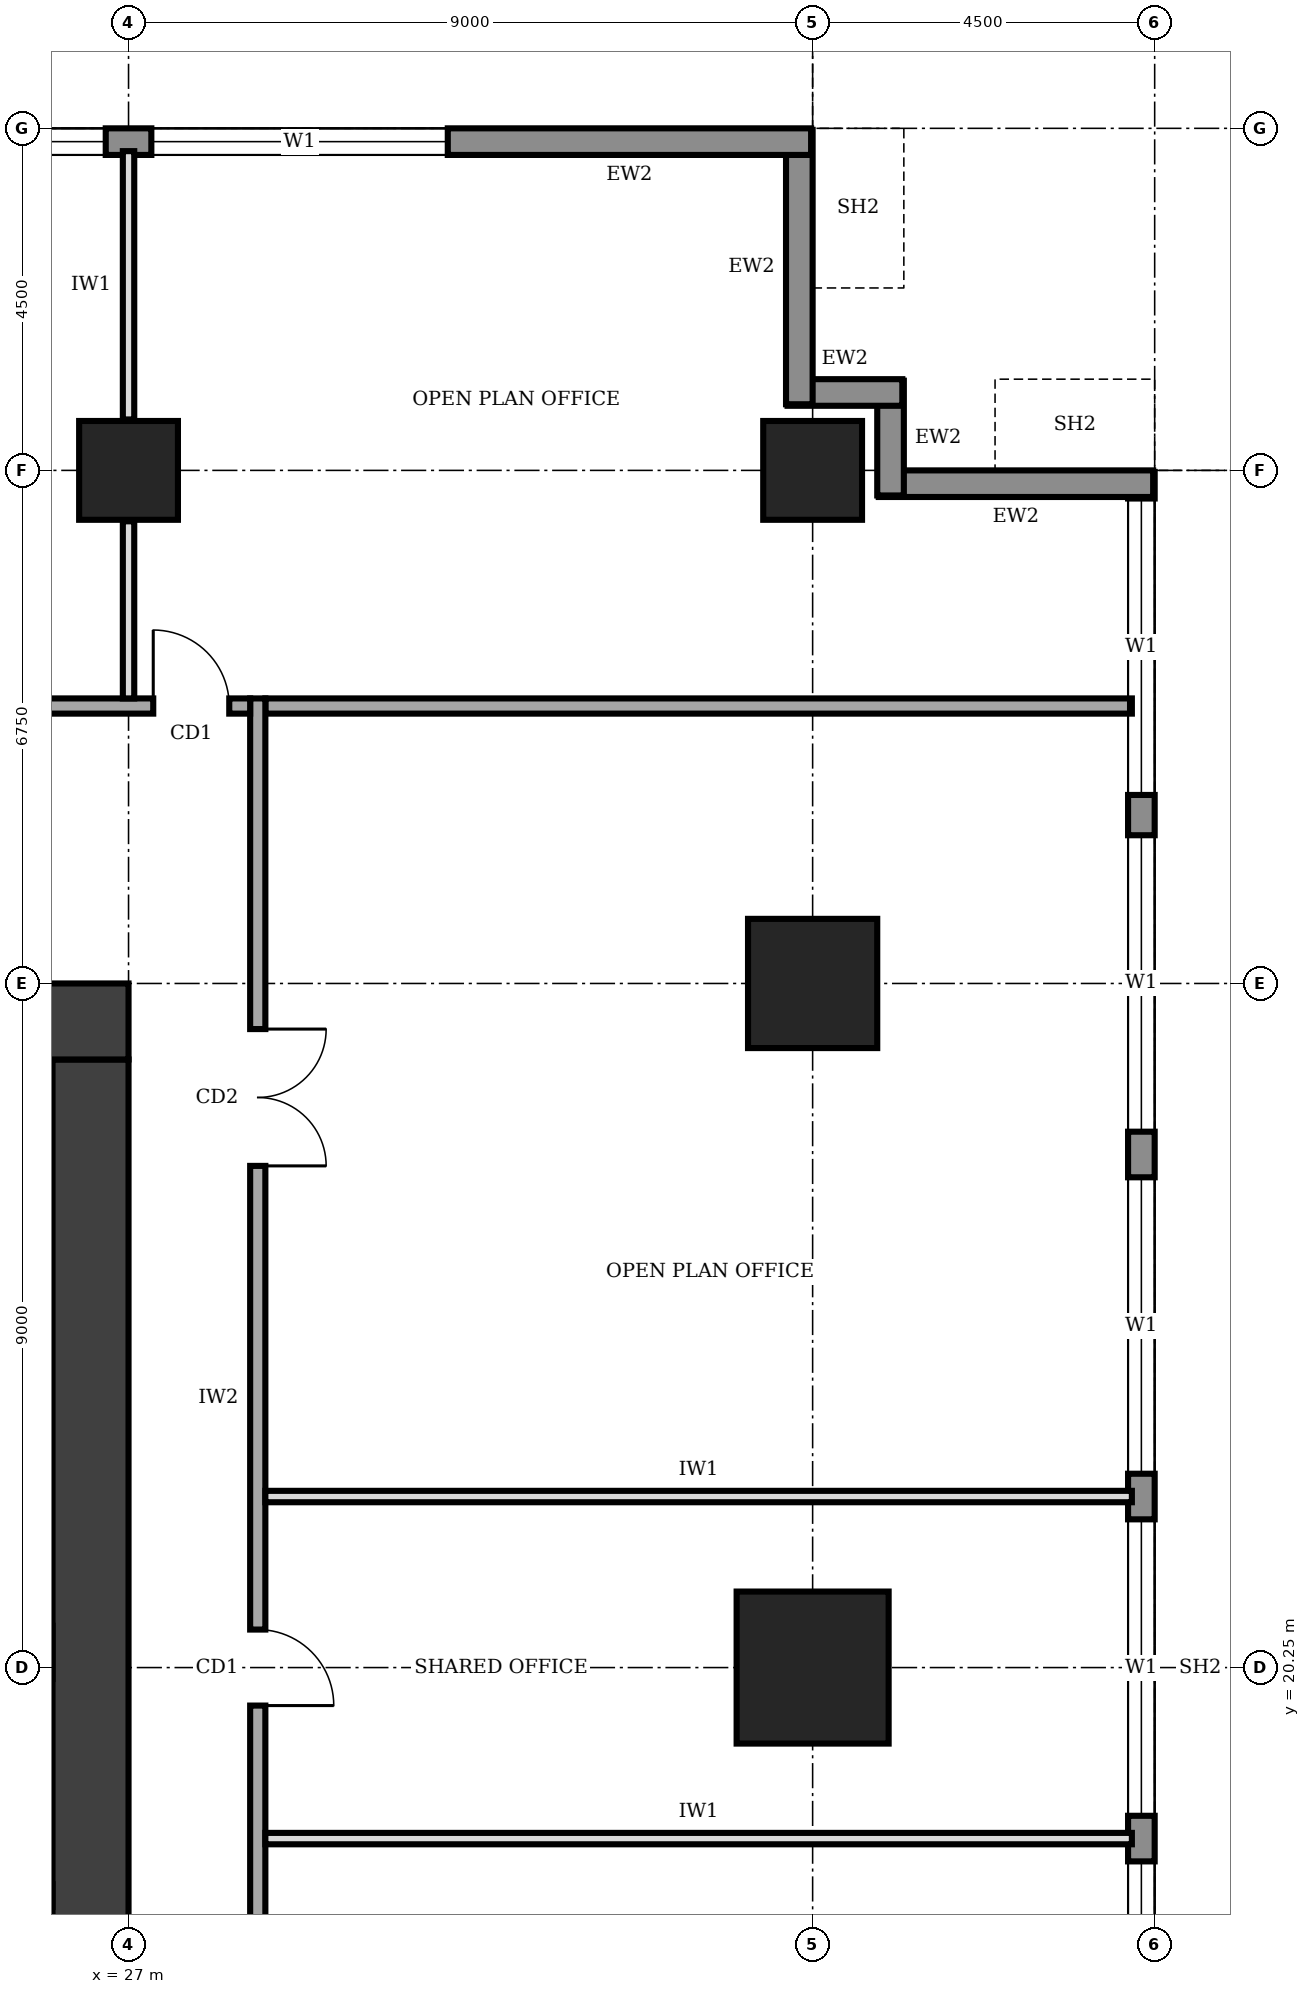
"""IFC4 building model, lengths in metres.
Left out: names, types, materials, properties, quantities, classifications, styles, units other than length and angle.
Written with IfcOpenShell. Run it as: python <this file> out.ifc"""

import sys

from ifc_helpers import new_model, si_unit, direction, frame, frame_2d, origin, origin_2d, place, context, subcontext, project, spatial, rectangle, extrude, element, fill, save


model = new_model("IFC4")
c1 = context("Model", 3, precision=1e-05, world=origin(), true_north=direction((0.0, 1.0)))
c2 = subcontext(c1, "Body", "Model", "MODEL_VIEW")
j1 = project(units=[si_unit("LENGTHUNIT", "METRE"), si_unit("PLANEANGLEUNIT", "RADIAN")], contexts=[c1])
p1 = place(None, origin())
s1 = spatial("IfcSite", under=j1, at=p1, CompositionType="ELEMENT")
p2 = place(p1, origin())
s2 = spatial("IfcBuilding", under=s1, at=p2, CompositionType="ELEMENT")
p3 = place(p2, frame((0.0, 0.0, 281.0)))
s3 = spatial("IfcBuildingStorey", under=s2, at=p3, CompositionType="ELEMENT", Elevation=281.0)
p4 = place(p3, frame((26.5, 12.25, 0.0), z_axis=(0.0, 0.0, 1.0), x_axis=(0.0, 1.0, 0.0)))
e1 = element("IfcWall", 1, at=p4, inside=s3, PredefinedType="SHEAR", context=c2, shape_type="SweptSolid", body=[
    extrude(rectangle(XDim=16.0, YDim=1.0, at=frame_2d((8.0, 0.0))), origin(), (0.0, 0.0, 1.0), 4.0),
])
p5 = place(p3, frame((27.0, 28.75, 0.0), z_axis=(0.0, 0.0, 1.0), x_axis=(-1.0, 0.0, 0.0)))
e2 = element("IfcWall", 2, at=p5, inside=s3, PredefinedType="SHEAR", context=c2, shape_type="SweptSolid", body=[
    extrude(rectangle(XDim=13.5, YDim=1.0, at=frame_2d((6.75, 0.0))), origin(), (0.0, 0.0, 1.0), 4.0),
])
p6 = place(p5, frame((4.75, 0.0, 0.0)))
e3 = element("IfcOpeningElement", 3, at=p6, cuts=e2, PredefinedType="OPENING", context=c2, shape_type="SweptSolid", body=[
    extrude(rectangle(XDim=1.8, YDim=2.1, at=frame_2d((0.9, 1.05))), frame((0.0, 0.51, 0.0), z_axis=(0.0, -1.0, 0.0), x_axis=(1.0, 0.0, 0.0)), (0.0, 0.0, 1.0), 1.02),
])
p7 = place(p3, frame((36.0, 20.25, 0.0), z_axis=(0.0, 0.0, 1.0), x_axis=(1.0, 0.0, 0.0)))
e4 = element("IfcColumn", 4, at=p7, inside=s3, PredefinedType="COLUMN", context=c2, shape_type="SweptSolid", body=[
    extrude(rectangle(XDim=2.0, YDim=2.0, at=origin_2d()), origin(), (0.0, 0.0, 1.0), 4.0),
])
p8 = place(p3, frame((36.0, 29.25, 0.0), z_axis=(0.0, 0.0, 1.0), x_axis=(1.0, 0.0, 0.0)))
e5 = element("IfcColumn", 5, at=p8, inside=s3, PredefinedType="COLUMN", context=c2, shape_type="SweptSolid", body=[
    extrude(rectangle(XDim=1.7, YDim=1.7, at=origin_2d()), origin(), (0.0, 0.0, 1.0), 4.0),
])
for number, where, z_axis, x_axis in (
    (6, (27.0, 36.0, 0.0), (0.0, 0.0, 1.0), (1.0, 0.0, 0.0)),
    (7, (36.0, 36.0, 0.0), (0.0, 0.0, 1.0), (1.0, 0.0, 0.0)),
):
    element("IfcColumn", number, at=place(p3, frame(where, z_axis=z_axis, x_axis=x_axis)), inside=s3, PredefinedType="COLUMN", context=c2, shape_type="SweptSolid", body=[
        extrude(rectangle(XDim=1.3, YDim=1.3, at=origin_2d()), origin(), (0.0, 0.0, 1.0), 4.0),
    ])
p9 = place(p3, frame((40.325, 4.52, 0.0), z_axis=(0.0, 0.0, 1.0), x_axis=(0.0, 1.0, 0.0)))
e8 = element("IfcWall", 8, at=p9, inside=s3, PredefinedType="STANDARD", context=c2, shape_type="SweptSolid", body=[
    extrude(rectangle(XDim=31.46, YDim=0.35, at=frame_2d((15.73, 0.0))), origin(), (0.0, 0.0, 1.0), 3.75),
])
p10 = place(p9, frame((4.78, 0.0, 0.9)))
e9 = element("IfcOpeningElement", 9, at=p10, cuts=e8, PredefinedType="OPENING", context=c2, shape_type="SweptSolid", body=[
    extrude(rectangle(XDim=3.9, YDim=2.2, at=frame_2d((1.95, 1.1))), frame((0.0, 0.185, 0.0), z_axis=(0.0, -1.0, 0.0), x_axis=(1.0, 0.0, 0.0)), (0.0, 0.0, 1.0), 0.37),
])
p11 = place(p9, frame((9.28, 0.0, 0.9)))
e10 = element("IfcOpeningElement", 10, at=p11, cuts=e8, PredefinedType="OPENING", context=c2, shape_type="SweptSolid", body=[
    extrude(rectangle(XDim=3.9, YDim=2.2, at=frame_2d((1.95, 1.1))), frame((0.0, 0.185, 0.0), z_axis=(0.0, -1.0, 0.0), x_axis=(1.0, 0.0, 0.0)), (0.0, 0.0, 1.0), 0.37),
])
p12 = place(p9, frame((13.78, 0.0, 0.9)))
e11 = element("IfcOpeningElement", 11, at=p12, cuts=e8, PredefinedType="OPENING", context=c2, shape_type="SweptSolid", body=[
    extrude(rectangle(XDim=3.9, YDim=2.2, at=frame_2d((1.95, 1.1))), frame((0.0, 0.185, 0.0), z_axis=(0.0, -1.0, 0.0), x_axis=(1.0, 0.0, 0.0)), (0.0, 0.0, 1.0), 0.37),
])
p13 = place(p9, frame((18.28, 0.0, 0.9)))
e12 = element("IfcOpeningElement", 12, at=p13, cuts=e8, PredefinedType="OPENING", context=c2, shape_type="SweptSolid", body=[
    extrude(rectangle(XDim=3.9, YDim=2.2, at=frame_2d((1.95, 1.1))), frame((0.0, 0.185, 0.0), z_axis=(0.0, -1.0, 0.0), x_axis=(1.0, 0.0, 0.0)), (0.0, 0.0, 1.0), 0.37),
])
p14 = place(p9, frame((22.78, 0.0, 0.9)))
e13 = element("IfcOpeningElement", 13, at=p14, cuts=e8, PredefinedType="OPENING", context=c2, shape_type="SweptSolid", body=[
    extrude(rectangle(XDim=3.9, YDim=2.2, at=frame_2d((1.95, 1.1))), frame((0.0, 0.185, 0.0), z_axis=(0.0, -1.0, 0.0), x_axis=(1.0, 0.0, 0.0)), (0.0, 0.0, 1.0), 0.37),
])
p15 = place(p9, frame((27.21, 0.0, 0.9)))
e14 = element("IfcOpeningElement", 14, at=p15, cuts=e8, PredefinedType="OPENING", context=c2, shape_type="SweptSolid", body=[
    extrude(rectangle(XDim=3.9, YDim=2.2, at=frame_2d((1.95, 1.1))), frame((0.0, 0.185, 0.0), z_axis=(0.0, -1.0, 0.0), x_axis=(1.0, 0.0, 0.0)), (0.0, 0.0, 1.0), 0.37),
])
p16 = place(p3, frame((40.48, 35.825, 0.0), z_axis=(0.0, 0.0, 1.0), x_axis=(-1.0, 0.0, 0.0)))
e15 = element("IfcWall", 15, at=p16, inside=s3, PredefinedType="STANDARD", context=c2, shape_type="SweptSolid", body=[
    extrude(rectangle(XDim=3.61, YDim=0.35, at=frame_2d((1.805, 0.0))), origin(), (0.0, 0.0, 1.0), 2.85),
])
for number, where, z_axis, x_axis in (
    (16, (37.025, 35.67, 0.0), (0.0, 0.0, 1.0), (0.0, 1.0, 0.0)),
    (17, (37.18, 37.025, 0.0), (0.0, 0.0, 1.0), (-1.0, 0.0, 0.0)),
):
    element("IfcWall", number, at=place(p3, frame(where, z_axis=z_axis, x_axis=x_axis)), inside=s3, PredefinedType="STANDARD", context=c2, shape_type="SweptSolid", body=[
        extrude(rectangle(XDim=1.51, YDim=0.35, at=frame_2d((0.755, 0.0))), origin(), (0.0, 0.0, 1.0), 3.75),
    ])
p17 = place(p3, frame((35.825, 36.87, 0.0), z_axis=(0.0, 0.0, 1.0), x_axis=(0.0, 1.0, 0.0)))
e18 = element("IfcWall", 18, at=p17, inside=s3, PredefinedType="STANDARD", context=c2, shape_type="SweptSolid", body=[
    extrude(rectangle(XDim=3.61, YDim=0.35, at=frame_2d((1.805, 0.0))), origin(), (0.0, 0.0, 1.0), 2.85),
])
p18 = place(p3, frame((35.98, 40.325, 0.0), z_axis=(0.0, 0.0, 1.0), x_axis=(-1.0, 0.0, 0.0)))
e19 = element("IfcWall", 19, at=p18, inside=s3, PredefinedType="STANDARD", context=c2, shape_type="SweptSolid", body=[
    extrude(rectangle(XDim=31.46, YDim=0.35, at=frame_2d((15.73, 0.0))), origin(), (0.0, 0.0, 1.0), 3.75),
])
p19 = place(p18, frame((27.21, 0.0, 0.9)))
e20 = element("IfcOpeningElement", 20, at=p19, cuts=e19, PredefinedType="OPENING", context=c2, shape_type="SweptSolid", body=[
    extrude(rectangle(XDim=3.9, YDim=2.2, at=frame_2d((1.95, 1.1))), frame((0.0, 0.185, 0.0), z_axis=(0.0, -1.0, 0.0), x_axis=(1.0, 0.0, 0.0)), (0.0, 0.0, 1.0), 0.37),
])
p20 = place(p18, frame((22.78, 0.0, 0.9)))
e21 = element("IfcOpeningElement", 21, at=p20, cuts=e19, PredefinedType="OPENING", context=c2, shape_type="SweptSolid", body=[
    extrude(rectangle(XDim=3.9, YDim=2.2, at=frame_2d((1.95, 1.1))), frame((0.0, 0.185, 0.0), z_axis=(0.0, -1.0, 0.0), x_axis=(1.0, 0.0, 0.0)), (0.0, 0.0, 1.0), 0.37),
])
p21 = place(p18, frame((18.28, 0.0, 0.9)))
e22 = element("IfcOpeningElement", 22, at=p21, cuts=e19, PredefinedType="OPENING", context=c2, shape_type="SweptSolid", body=[
    extrude(rectangle(XDim=3.9, YDim=2.2, at=frame_2d((1.95, 1.1))), frame((0.0, 0.185, 0.0), z_axis=(0.0, -1.0, 0.0), x_axis=(1.0, 0.0, 0.0)), (0.0, 0.0, 1.0), 0.37),
])
p22 = place(p18, frame((13.78, 0.0, 0.9)))
e23 = element("IfcOpeningElement", 23, at=p22, cuts=e19, PredefinedType="OPENING", context=c2, shape_type="SweptSolid", body=[
    extrude(rectangle(XDim=3.9, YDim=2.2, at=frame_2d((1.95, 1.1))), frame((0.0, 0.185, 0.0), z_axis=(0.0, -1.0, 0.0), x_axis=(1.0, 0.0, 0.0)), (0.0, 0.0, 1.0), 0.37),
])
p23 = place(p18, frame((9.28, 0.0, 0.9)))
e24 = element("IfcOpeningElement", 24, at=p23, cuts=e19, PredefinedType="OPENING", context=c2, shape_type="SweptSolid", body=[
    extrude(rectangle(XDim=3.9, YDim=2.2, at=frame_2d((1.95, 1.1))), frame((0.0, 0.185, 0.0), z_axis=(0.0, -1.0, 0.0), x_axis=(1.0, 0.0, 0.0)), (0.0, 0.0, 1.0), 0.37),
])
p24 = place(p18, frame((4.78, 0.0, 0.9)))
e25 = element("IfcOpeningElement", 25, at=p24, cuts=e19, PredefinedType="OPENING", context=c2, shape_type="SweptSolid", body=[
    extrude(rectangle(XDim=3.9, YDim=2.2, at=frame_2d((1.95, 1.1))), frame((0.0, 0.185, 0.0), z_axis=(0.0, -1.0, 0.0), x_axis=(1.0, 0.0, 0.0)), (0.0, 0.0, 1.0), 0.37),
])
p25 = place(p3, frame((28.7, 9.2, 0.0), z_axis=(0.0, 0.0, 1.0), x_axis=(0.0, 1.0, 0.0)))
e26 = element("IfcWall", 26, at=p25, inside=s3, PredefinedType="SOLIDWALL", context=c2, shape_type="SweptSolid", body=[
    extrude(rectangle(XDim=23.8, YDim=0.2, at=frame_2d((11.9, 0.0))), origin(), (0.0, 0.0, 1.0), 3.75),
])
p26 = place(p25, frame((3.4, 0.0, 0.0)))
e27 = element("IfcOpeningElement", 27, at=p26, cuts=e26, PredefinedType="OPENING", context=c2, shape_type="SweptSolid", body=[
    extrude(rectangle(XDim=1.8, YDim=2.1, at=frame_2d((0.9, 1.05))), frame((0.0, 0.11, 0.0), z_axis=(0.0, -1.0, 0.0), x_axis=(1.0, 0.0, 0.0)), (0.0, 0.0, 1.0), 0.22),
])
p27 = place(p25, frame((10.55, 0.0, 0.0)))
e28 = element("IfcOpeningElement", 28, at=p27, cuts=e26, PredefinedType="OPENING", context=c2, shape_type="SweptSolid", body=[
    extrude(rectangle(XDim=1.0, YDim=2.1, at=frame_2d((0.5, 1.05))), frame((0.0, 0.11, 0.0), z_axis=(0.0, -1.0, 0.0), x_axis=(1.0, 0.0, 0.0)), (0.0, 0.0, 1.0), 0.22),
])
p28 = place(p25, frame((17.65, 0.0, 0.0)))
e29 = element("IfcOpeningElement", 29, at=p28, cuts=e26, PredefinedType="OPENING", context=c2, shape_type="SweptSolid", body=[
    extrude(rectangle(XDim=1.8, YDim=2.1, at=frame_2d((0.9, 1.05))), frame((0.0, 0.11, 0.0), z_axis=(0.0, -1.0, 0.0), x_axis=(1.0, 0.0, 0.0)), (0.0, 0.0, 1.0), 0.22),
])
p29 = place(p3, frame((28.6, 32.9, 0.0), z_axis=(0.0, 0.0, 1.0), x_axis=(-1.0, 0.0, 0.0)))
e30 = element("IfcWall", 30, at=p29, inside=s3, PredefinedType="SOLIDWALL", context=c2, shape_type="SweptSolid", body=[
    extrude(rectangle(XDim=16.9, YDim=0.2, at=frame_2d((8.45, 0.0))), origin(), (0.0, 0.0, 1.0), 3.75),
])
p30 = place(p29, frame((15.425, 0.0, 0.0)))
e31 = element("IfcOpeningElement", 31, at=p30, cuts=e30, PredefinedType="OPENING", context=c2, shape_type="SweptSolid", body=[
    extrude(rectangle(XDim=1.0, YDim=2.1, at=frame_2d((0.5, 1.05))), frame((0.0, 0.11, 0.0), z_axis=(0.0, -1.0, 0.0), x_axis=(1.0, 0.0, 0.0)), (0.0, 0.0, 1.0), 0.22),
])
p31 = place(p29, frame((7.45, 0.0, 0.0)))
e32 = element("IfcOpeningElement", 32, at=p31, cuts=e30, PredefinedType="OPENING", context=c2, shape_type="SweptSolid", body=[
    extrude(rectangle(XDim=1.8, YDim=2.1, at=frame_2d((0.9, 1.05))), frame((0.0, 0.11, 0.0), z_axis=(0.0, -1.0, 0.0), x_axis=(1.0, 0.0, 0.0)), (0.0, 0.0, 1.0), 0.22),
])
p32 = place(p29, frame((0.275, 0.0, 0.0)))
e33 = element("IfcOpeningElement", 33, at=p32, cuts=e30, PredefinedType="OPENING", context=c2, shape_type="SweptSolid", body=[
    extrude(rectangle(XDim=1.0, YDim=2.1, at=frame_2d((0.5, 1.05))), frame((0.0, 0.11, 0.0), z_axis=(0.0, -1.0, 0.0), x_axis=(1.0, 0.0, 0.0)), (0.0, 0.0, 1.0), 0.22),
])
p33 = place(p3, frame((28.8, 32.9, 0.0), z_axis=(0.0, 0.0, 1.0), x_axis=(1.0, 0.0, 0.0)))
e34 = element("IfcWall", 34, at=p33, inside=s3, PredefinedType="SOLIDWALL", context=c2, shape_type="SweptSolid", body=[
    extrude(rectangle(XDim=11.4, YDim=0.2, at=frame_2d((5.7, 0.0))), origin(), (0.0, 0.0, 1.0), 3.75),
])
p34 = place(p3, frame((27.0, 33.0, 0.0), z_axis=(0.0, 0.0, 1.0), x_axis=(0.0, 1.0, 0.0)))
e35 = element("IfcWall", 35, at=p34, inside=s3, PredefinedType="PARTITIONING", context=c2, shape_type="SweptSolid", body=[
    extrude(rectangle(XDim=2.33, YDim=0.15, at=frame_2d((1.165, 0.0))), origin(), (0.0, 0.0, 1.0), 2.85),
])
p35 = place(p3, frame((27.0, 36.67, 0.0), z_axis=(0.0, 0.0, 1.0), x_axis=(0.0, 1.0, 0.0)))
e36 = element("IfcWall", 36, at=p35, inside=s3, PredefinedType="PARTITIONING", context=c2, shape_type="SweptSolid", body=[
    extrude(rectangle(XDim=3.53, YDim=0.15, at=frame_2d((1.765, 0.0))), origin(), (0.0, 0.0, 1.0), 2.85),
])
for number, where, z_axis, x_axis in (
    (37, (28.8, 18.0, 0.0), (0.0, 0.0, 1.0), (1.0, 0.0, 0.0)),
    (38, (28.8, 22.5, 0.0), (0.0, 0.0, 1.0), (1.0, 0.0, 0.0)),
):
    element("IfcWall", number, at=place(p3, frame(where, z_axis=z_axis, x_axis=x_axis)), inside=s3, PredefinedType="PARTITIONING", context=c2, shape_type="SweptSolid", body=[
        extrude(rectangle(XDim=11.4, YDim=0.15, at=frame_2d((5.7, 0.0))), origin(), (0.0, 0.0, 1.0), 3.75),
    ])
p36 = place(p11, origin())
e39 = element("IfcWindow", 39, at=p36, inside=s3, PartitioningType="SINGLE_PANEL", PredefinedType="WINDOW", context=c2, shape_type="SweptSolid", body=[
    extrude(rectangle(XDim=3.9, YDim=2.2, at=frame_2d((1.95, 1.1))), frame((0.0, 0.03, 0.0), z_axis=(0.0, -1.0, 0.0), x_axis=(1.0, 0.0, 0.0)), (0.0, 0.0, 1.0), 0.06),
])
fill(e10, e39)
p37 = place(p12, origin())
e40 = element("IfcWindow", 40, at=p37, inside=s3, PartitioningType="SINGLE_PANEL", PredefinedType="WINDOW", context=c2, shape_type="SweptSolid", body=[
    extrude(rectangle(XDim=3.9, YDim=2.2, at=frame_2d((1.95, 1.1))), frame((0.0, 0.03, 0.0), z_axis=(0.0, -1.0, 0.0), x_axis=(1.0, 0.0, 0.0)), (0.0, 0.0, 1.0), 0.06),
])
fill(e11, e40)
p38 = place(p13, origin())
e41 = element("IfcWindow", 41, at=p38, inside=s3, PartitioningType="SINGLE_PANEL", PredefinedType="WINDOW", context=c2, shape_type="SweptSolid", body=[
    extrude(rectangle(XDim=3.9, YDim=2.2, at=frame_2d((1.95, 1.1))), frame((0.0, 0.03, 0.0), z_axis=(0.0, -1.0, 0.0), x_axis=(1.0, 0.0, 0.0)), (0.0, 0.0, 1.0), 0.06),
])
fill(e12, e41)
p39 = place(p14, origin())
e42 = element("IfcWindow", 42, at=p39, inside=s3, PartitioningType="SINGLE_PANEL", PredefinedType="WINDOW", context=c2, shape_type="SweptSolid", body=[
    extrude(rectangle(XDim=3.9, YDim=2.2, at=frame_2d((1.95, 1.1))), frame((0.0, 0.03, 0.0), z_axis=(0.0, -1.0, 0.0), x_axis=(1.0, 0.0, 0.0)), (0.0, 0.0, 1.0), 0.06),
])
fill(e13, e42)
p40 = place(p15, origin())
e43 = element("IfcWindow", 43, at=p40, inside=s3, PartitioningType="SINGLE_PANEL", PredefinedType="WINDOW", context=c2, shape_type="SweptSolid", body=[
    extrude(rectangle(XDim=3.9, YDim=2.2, at=frame_2d((1.95, 1.1))), frame((0.0, 0.03, 0.0), z_axis=(0.0, -1.0, 0.0), x_axis=(1.0, 0.0, 0.0)), (0.0, 0.0, 1.0), 0.06),
])
fill(e14, e43)
p41 = place(p23, origin())
e44 = element("IfcWindow", 44, at=p41, inside=s3, PartitioningType="SINGLE_PANEL", PredefinedType="WINDOW", context=c2, shape_type="SweptSolid", body=[
    extrude(rectangle(XDim=3.9, YDim=2.2, at=frame_2d((1.95, 1.1))), frame((0.0, 0.03, 0.0), z_axis=(0.0, -1.0, 0.0), x_axis=(1.0, 0.0, 0.0)), (0.0, 0.0, 1.0), 0.06),
])
fill(e24, e44)
p42 = place(p24, origin())
e45 = element("IfcWindow", 45, at=p42, inside=s3, PartitioningType="SINGLE_PANEL", PredefinedType="WINDOW", context=c2, shape_type="SweptSolid", body=[
    extrude(rectangle(XDim=3.9, YDim=2.2, at=frame_2d((1.95, 1.1))), frame((0.0, 0.03, 0.0), z_axis=(0.0, -1.0, 0.0), x_axis=(1.0, 0.0, 0.0)), (0.0, 0.0, 1.0), 0.06),
])
fill(e25, e45)
p43 = place(p27, frame((1.0, 0.0, 0.0), z_axis=(0.0, 0.0, 1.0), x_axis=(-1.0, 0.0, 0.0)))
e46 = element("IfcDoor", 46, at=p43, inside=s3, OperationType="SINGLE_SWING_RIGHT", PredefinedType="DOOR", context=c2, shape_type="SweptSolid", body=[
    extrude(rectangle(XDim=1.0, YDim=2.1, at=frame_2d((0.5, 1.05))), frame((0.0, 0.025, 0.0), z_axis=(0.0, -1.0, 0.0), x_axis=(1.0, 0.0, 0.0)), (0.0, 0.0, 1.0), 0.05),
])
fill(e28, e46)
p44 = place(p28, frame((1.8, 0.0, 0.0), z_axis=(0.0, 0.0, 1.0), x_axis=(-1.0, 0.0, 0.0)))
e47 = element("IfcDoor", 47, at=p44, inside=s3, OperationType="DOUBLE_DOOR_SINGLE_SWING", PredefinedType="DOOR", context=c2, shape_type="SweptSolid", body=[
    extrude(rectangle(XDim=1.8, YDim=2.1, at=frame_2d((0.9, 1.05))), frame((0.0, 0.025, 0.0), z_axis=(0.0, -1.0, 0.0), x_axis=(1.0, 0.0, 0.0)), (0.0, 0.0, 1.0), 0.05),
])
fill(e29, e47)
p45 = place(p32, frame((1.0, 0.0, 0.0), z_axis=(0.0, 0.0, 1.0), x_axis=(-1.0, 0.0, 0.0)))
e48 = element("IfcDoor", 48, at=p45, inside=s3, OperationType="SINGLE_SWING_LEFT", PredefinedType="DOOR", context=c2, shape_type="SweptSolid", body=[
    extrude(rectangle(XDim=1.0, YDim=2.1, at=frame_2d((0.5, 1.05))), frame((0.0, 0.025, 0.0), z_axis=(0.0, -1.0, 0.0), x_axis=(1.0, 0.0, 0.0)), (0.0, 0.0, 1.0), 0.05),
])
fill(e33, e48)
save(model, sys.argv[1])
